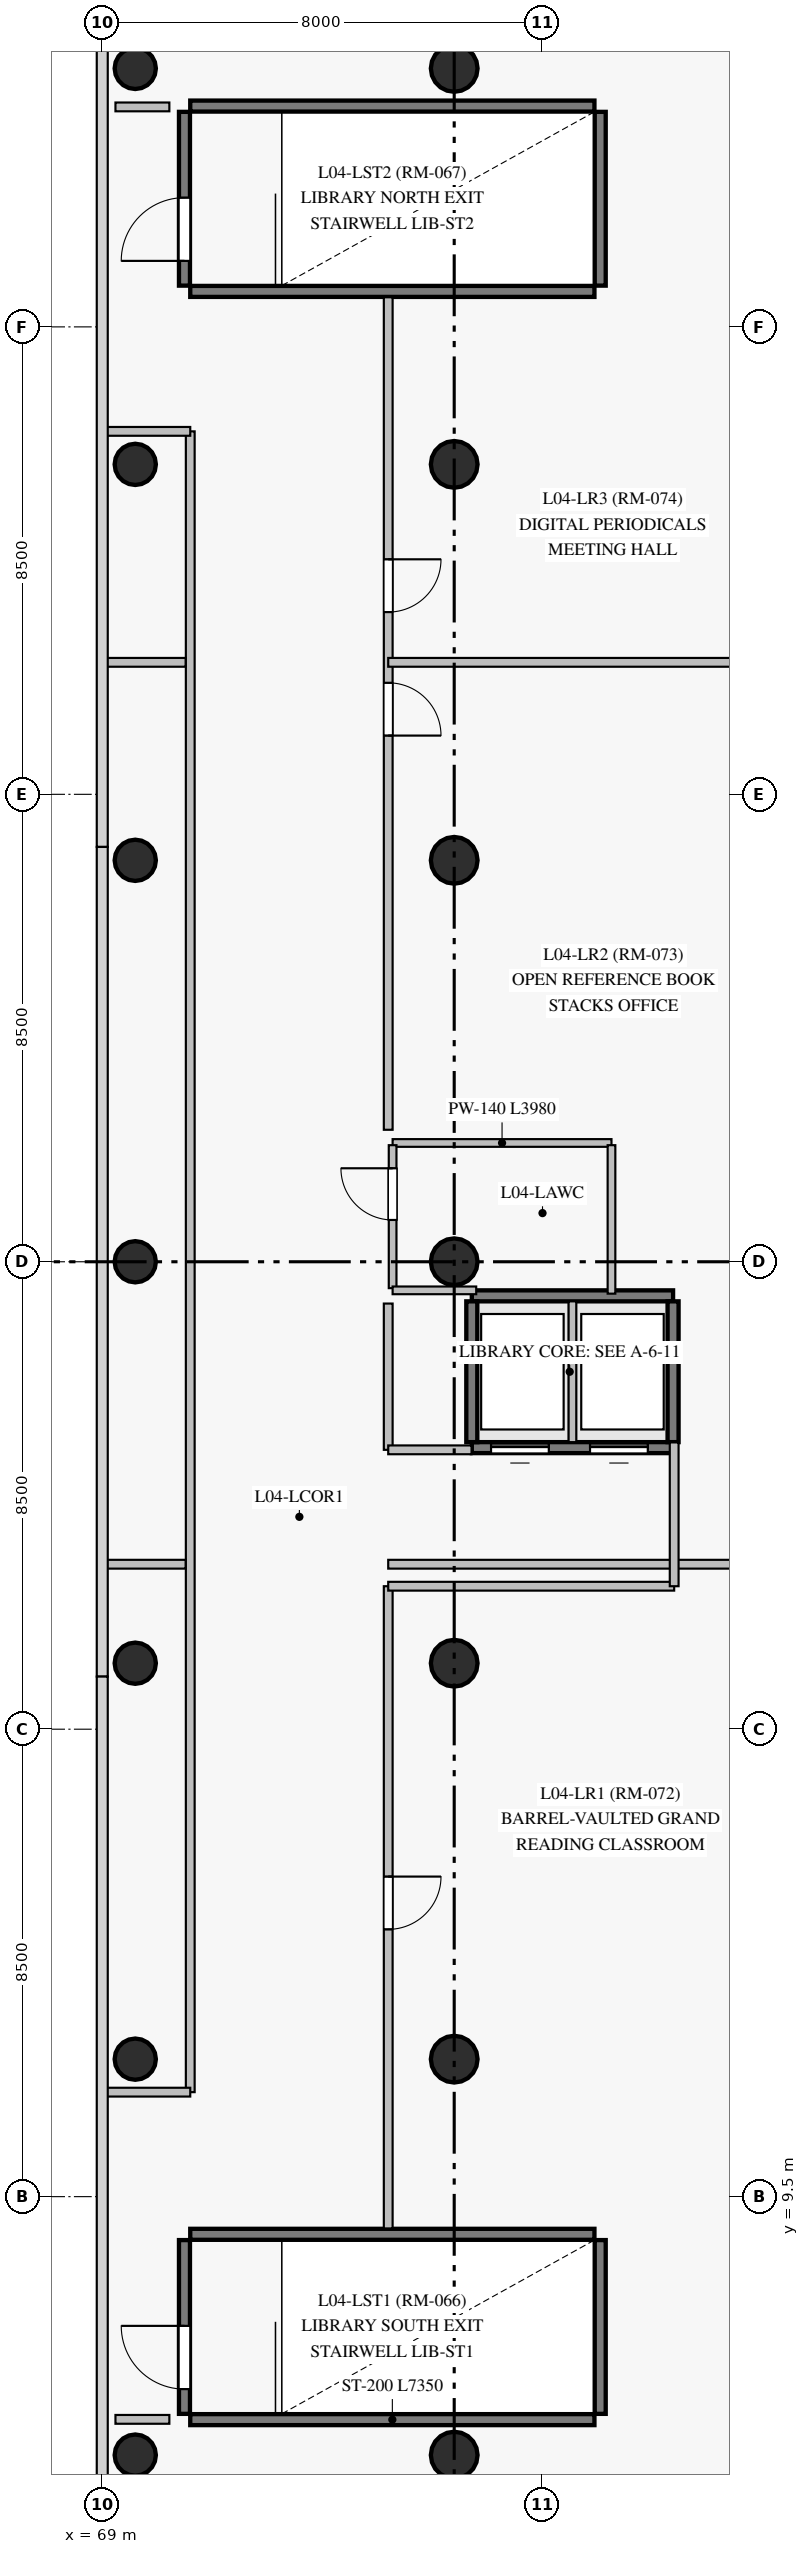
"""IFC4 building model, lengths in metres.
Left out: names, types, materials, properties, quantities, classifications, styles, units other than length and angle.
Written with IfcOpenShell. Run it as: python <this file> out.ifc"""

import sys

from ifc_helpers import new_model, si_unit, direction, frame, frame_2d, origin, origin_with_axes, origin_2d, place, context, subcontext, project, spatial, rectangle, circle, extrude, source, transform, mapped, element, fill, save


model = new_model("IFC4")
c1 = context("Model", 3, precision=1e-05, world=origin(), true_north=direction((0.0, 1.0)))
c2 = subcontext(c1, "Body", "Model", "MODEL_VIEW")
j1 = project(units=[si_unit("LENGTHUNIT", "METRE"), si_unit("PLANEANGLEUNIT", "RADIAN")], contexts=[c1])
p1 = place(None, origin())
s1 = spatial("IfcSite", under=j1, at=p1, CompositionType="ELEMENT")
p2 = place(p1, origin())
s2 = spatial("IfcBuilding", under=s1, at=p2, CompositionType="ELEMENT")
p3 = place(p2, frame((0.0, 0.0, 18.0)))
s3 = spatial("IfcBuildingStorey", under=s2, at=p3, CompositionType="ELEMENT", Elevation=18.0)
m1 = source(origin_with_axes(), c2, "Body", "SweptSolid", [
    extrude(circle(Radius=0.375, at=origin_2d()), origin(), (0.0, 0.0, 1.0), 4.225),
])
for number, where, z_axis, x_axis in (
    (1, (69.6, 4.8, 0.0), (0.0, 0.0, 1.0), (1.0, 0.0, 0.0)),
    (2, (69.6, 12.0, 0.0), (0.0, 0.0, 1.0), (1.0, 0.0, 0.0)),
    (3, (69.6, 19.2, 0.0), (0.0, 0.0, 1.0), (1.0, 0.0, 0.0)),
    (4, (69.6, 26.5, 0.0), (0.0, 0.0, 1.0), (1.0, 0.0, 0.0)),
    (5, (69.6, 33.8, 0.0), (0.0, 0.0, 1.0), (1.0, 0.0, 0.0)),
    (6, (69.6, 41.0, 0.0), (0.0, 0.0, 1.0), (1.0, 0.0, 0.0)),
    (7, (69.6, 48.2, 0.0), (0.0, 0.0, 1.0), (1.0, 0.0, 0.0)),
):
    element("IfcColumn", number, at=place(p3, frame(where, z_axis=z_axis, x_axis=x_axis)), inside=s3, PredefinedType="COLUMN", context=c2, shape_type="MappedRepresentation", body=[
        mapped(m1, transform((0.0, 0.0, 0.0), scale=1.0)),
    ])
m2 = source(origin_with_axes(), c2, "Body", "SweptSolid", [
    extrude(circle(Radius=0.425, at=origin_2d()), origin(), (0.0, 0.0, 1.0), 4.225),
])
for number, where, z_axis, x_axis in (
    (8, (75.4, 4.8, 0.0), (0.0, 0.0, 1.0), (1.0, 0.0, 0.0)),
    (9, (75.4, 12.0, 0.0), (0.0, 0.0, 1.0), (1.0, 0.0, 0.0)),
    (10, (75.4, 19.2, 0.0), (0.0, 0.0, 1.0), (1.0, 0.0, 0.0)),
    (11, (75.4, 26.5, 0.0), (0.0, 0.0, 1.0), (1.0, 0.0, 0.0)),
    (12, (75.4, 33.8, 0.0), (0.0, 0.0, 1.0), (1.0, 0.0, 0.0)),
    (13, (75.4, 41.0, 0.0), (0.0, 0.0, 1.0), (1.0, 0.0, 0.0)),
    (14, (75.4, 48.2, 0.0), (0.0, 0.0, 1.0), (1.0, 0.0, 0.0)),
):
    element("IfcColumn", number, at=place(p3, frame(where, z_axis=z_axis, x_axis=x_axis)), inside=s3, PredefinedType="COLUMN", context=c2, shape_type="MappedRepresentation", body=[
        mapped(m2, transform((0.0, 0.0, 0.0), scale=1.0)),
    ])
for number, where, z_axis, x_axis in (
    (15, (70.6, 5.445, 0.0), (0.0, 0.0, 1.0), (1.0, 0.0, 0.0)),
    (16, (70.6, 8.815, 0.0), (0.0, 0.0, 1.0), (1.0, 0.0, 0.0)),
    (17, (70.6, 44.145, 0.0), (0.0, 0.0, 1.0), (1.0, 0.0, 0.0)),
    (18, (70.6, 47.515, 0.0), (0.0, 0.0, 1.0), (1.0, 0.0, 0.0)),
):
    element("IfcWall", number, at=place(p3, frame(where, z_axis=z_axis, x_axis=x_axis)), inside=s3, PredefinedType="SHEAR", context=c2, shape_type="SweptSolid", body=[
        extrude(rectangle(XDim=7.35, YDim=0.2, at=frame_2d((3.675, 0.0))), origin(), (0.0, 0.0, 1.0), 4.225),
    ])
p4 = place(p3, frame((75.72, 23.12, 0.0), z_axis=(0.0, 0.0, 1.0), x_axis=(1.0, 0.0, 0.0)))
e19 = element("IfcWall", 19, at=p4, inside=s3, PredefinedType="SHEAR", context=c2, shape_type="SweptSolid", body=[
    extrude(rectangle(XDim=3.66, YDim=0.2, at=frame_2d((1.83, 0.0))), origin(), (0.0, 0.0, 1.0), 4.225),
])
p5 = place(p4, frame((0.35, 0.0, 0.0)))
e20 = element("IfcOpeningElement", 20, at=p5, cuts=e19, PredefinedType="OPENING", context=c2, shape_type="SweptSolid", body=[
    extrude(rectangle(XDim=1.05, YDim=2.15, at=frame_2d((0.525, 1.075))), frame((0.0, 0.11, 0.0), z_axis=(0.0, -1.0, 0.0), x_axis=(1.0, 0.0, 0.0)), (0.0, 0.0, 1.0), 0.22),
])
p6 = place(p4, frame((2.15, 0.0, 0.0)))
e21 = element("IfcOpeningElement", 21, at=p6, cuts=e19, PredefinedType="OPENING", context=c2, shape_type="SweptSolid", body=[
    extrude(rectangle(XDim=1.05, YDim=2.15, at=frame_2d((0.525, 1.075))), frame((0.0, 0.11, 0.0), z_axis=(0.0, -1.0, 0.0), x_axis=(1.0, 0.0, 0.0)), (0.0, 0.0, 1.0), 0.22),
])
p7 = place(p3, frame((75.72, 25.88, 0.0), z_axis=(0.0, 0.0, 1.0), x_axis=(1.0, 0.0, 0.0)))
e22 = element("IfcWall", 22, at=p7, inside=s3, PredefinedType="SHEAR", context=c2, shape_type="SweptSolid", body=[
    extrude(rectangle(XDim=3.66, YDim=0.2, at=frame_2d((1.83, 0.0))), origin(), (0.0, 0.0, 1.0), 4.225),
])
p8 = place(p3, frame((70.495, 5.55, 0.0), z_axis=(0.0, 0.0, 1.0), x_axis=(0.0, 1.0, 0.0)))
e23 = element("IfcWall", 23, at=p8, inside=s3, PredefinedType="SHEAR", context=c2, shape_type="SweptSolid", body=[
    extrude(rectangle(XDim=3.16, YDim=0.2, at=frame_2d((1.58, 0.0))), origin(), (0.0, 0.0, 1.0), 4.225),
])
p9 = place(p8, frame((0.45, 0.0, 0.0)))
e24 = element("IfcOpeningElement", 24, at=p9, cuts=e23, PredefinedType="OPENING", context=c2, shape_type="SweptSolid", body=[
    extrude(rectangle(XDim=1.15, YDim=2.15, at=frame_2d((0.575, 1.075))), frame((0.0, 0.11, 0.0), z_axis=(0.0, -1.0, 0.0), x_axis=(1.0, 0.0, 0.0)), (0.0, 0.0, 1.0), 0.22),
])
p10 = place(p3, frame((78.055, 5.55, 0.0), z_axis=(0.0, 0.0, 1.0), x_axis=(0.0, 1.0, 0.0)))
e25 = element("IfcWall", 25, at=p10, inside=s3, PredefinedType="SHEAR", context=c2, shape_type="SweptSolid", body=[
    extrude(rectangle(XDim=3.16, YDim=0.2, at=frame_2d((1.58, 0.0))), origin(), (0.0, 0.0, 1.0), 4.225),
])
p11 = place(p3, frame((70.495, 44.25, 0.0), z_axis=(0.0, 0.0, 1.0), x_axis=(0.0, 1.0, 0.0)))
e26 = element("IfcWall", 26, at=p11, inside=s3, PredefinedType="SHEAR", context=c2, shape_type="SweptSolid", body=[
    extrude(rectangle(XDim=3.16, YDim=0.2, at=frame_2d((1.58, 0.0))), origin(), (0.0, 0.0, 1.0), 4.225),
])
p12 = place(p11, frame((0.45, 0.0, 0.0)))
e27 = element("IfcOpeningElement", 27, at=p12, cuts=e26, PredefinedType="OPENING", context=c2, shape_type="SweptSolid", body=[
    extrude(rectangle(XDim=1.15, YDim=2.15, at=frame_2d((0.575, 1.075))), frame((0.0, 0.11, 0.0), z_axis=(0.0, -1.0, 0.0), x_axis=(1.0, 0.0, 0.0)), (0.0, 0.0, 1.0), 0.22),
])
p13 = place(p3, frame((78.055, 44.25, 0.0), z_axis=(0.0, 0.0, 1.0), x_axis=(0.0, 1.0, 0.0)))
e28 = element("IfcWall", 28, at=p13, inside=s3, PredefinedType="SHEAR", context=c2, shape_type="SweptSolid", body=[
    extrude(rectangle(XDim=3.16, YDim=0.2, at=frame_2d((1.58, 0.0))), origin(), (0.0, 0.0, 1.0), 4.225),
])
for number, where, z_axis, x_axis in (
    (29, (75.72, 23.22, 0.0), (0.0, 0.0, 1.0), (0.0, 1.0, 0.0)),
    (30, (79.38, 23.22, 0.0), (0.0, 0.0, 1.0), (0.0, 1.0, 0.0)),
):
    element("IfcWall", number, at=place(p3, frame(where, z_axis=z_axis, x_axis=x_axis)), inside=s3, PredefinedType="SHEAR", context=c2, shape_type="SweptSolid", body=[
        extrude(rectangle(XDim=2.56, YDim=0.2, at=frame_2d((1.28, 0.0))), origin(), (0.0, 0.0, 1.0), 4.225),
    ])
p14 = place(p3, frame((70.6, 11.4, 0.0), z_axis=(0.0, 0.0, 1.0), x_axis=(0.0, 1.0, 0.0)))
e31 = element("IfcWall", 31, at=p14, inside=s3, PredefinedType="PARTITIONING", context=c2, shape_type="SweptSolid", body=[
    extrude(rectangle(XDim=30.2, YDim=0.16, at=frame_2d((15.1, 0.0))), origin(), (0.0, 0.0, 1.0), 4.225),
])
p15 = place(p3, frame((74.2, 44.038, 0.0), z_axis=(0.0, 0.0, 1.0), x_axis=(0.0, -1.0, 0.0)))
e32 = element("IfcWall", 32, at=p15, inside=s3, PredefinedType="PARTITIONING", context=c2, shape_type="SweptSolid", body=[
    extrude(rectangle(XDim=15.138, YDim=0.16, at=frame_2d((7.569, 0.0))), origin(), (0.0, 0.0, 1.0), 4.225),
])
p16 = place(p15, frame((7.01, 0.0, 0.0)))
e33 = element("IfcOpeningElement", 33, at=p16, cuts=e32, PredefinedType="OPENING", context=c2, shape_type="SweptSolid", body=[
    extrude(rectangle(XDim=0.96, YDim=2.15, at=frame_2d((0.48, 1.075))), frame((0.0, 0.09, 0.0), z_axis=(0.0, -1.0, 0.0), x_axis=(1.0, 0.0, 0.0)), (0.0, 0.0, 1.0), 0.18),
])
p17 = place(p15, frame((4.764, 0.0, 0.0)))
e34 = element("IfcOpeningElement", 34, at=p17, cuts=e32, PredefinedType="OPENING", context=c2, shape_type="SweptSolid", body=[
    extrude(rectangle(XDim=0.96, YDim=2.15, at=frame_2d((0.48, 1.075))), frame((0.0, 0.09, 0.0), z_axis=(0.0, -1.0, 0.0), x_axis=(1.0, 0.0, 0.0)), (0.0, 0.0, 1.0), 0.18),
])
p18 = place(p3, frame((74.2, 20.6, 0.0), z_axis=(0.0, 0.0, 1.0), x_axis=(0.0, -1.0, 0.0)))
e35 = element("IfcWall", 35, at=p18, inside=s3, PredefinedType="PARTITIONING", context=c2, shape_type="SweptSolid", body=[
    extrude(rectangle(XDim=11.678, YDim=0.16, at=frame_2d((5.839, 0.0))), origin(), (0.0, 0.0, 1.0), 4.225),
])
p19 = place(p18, frame((5.28, 0.0, 0.0)))
e36 = element("IfcOpeningElement", 36, at=p19, cuts=e35, PredefinedType="OPENING", context=c2, shape_type="SweptSolid", body=[
    extrude(rectangle(XDim=0.96, YDim=2.15, at=frame_2d((0.48, 1.075))), frame((0.0, 0.09, 0.0), z_axis=(0.0, -1.0, 0.0), x_axis=(1.0, 0.0, 0.0)), (0.0, 0.0, 1.0), 0.18),
])
for number, where, z_axis, x_axis in (
    (37, (74.2, 21.0, 0.0), (0.0, 0.0, 1.0), (1.0, 0.0, 0.0)),
    (38, (74.2, 37.4, 0.0), (0.0, 0.0, 1.0), (1.0, 0.0, 0.0)),
):
    element("IfcWall", number, at=place(p3, frame(where, z_axis=z_axis, x_axis=x_axis)), inside=s3, PredefinedType="PARTITIONING", context=c2, shape_type="SweptSolid", body=[
        extrude(rectangle(XDim=7.545, YDim=0.16, at=frame_2d((3.772, 0.0))), origin(), (0.0, 0.0, 1.0), 4.225),
    ])
p20 = place(p3, frame((79.4, 20.6, 0.0), z_axis=(0.0, 0.0, 1.0), x_axis=(-1.0, 0.0, 0.0)))
e39 = element("IfcWall", 39, at=p20, inside=s3, PredefinedType="PARTITIONING", context=c2, shape_type="SweptSolid", body=[
    extrude(rectangle(XDim=5.2, YDim=0.16, at=frame_2d((2.6, 0.0))), origin(), (0.0, 0.0, 1.0), 4.225),
])
p21 = place(p3, frame((74.28, 28.66, 0.0), z_axis=(0.0, 0.0, 1.0), x_axis=(1.0, 0.0, 0.0)))
e40 = element("IfcWall", 40, at=p21, inside=s3, PredefinedType="PARTITIONING", context=c2, shape_type="SweptSolid", body=[
    extrude(rectangle(XDim=3.98, YDim=0.14, at=frame_2d((1.99, 0.0))), origin(), (0.0, 0.0, 1.0), 4.225),
])
p22 = place(p3, frame((78.26, 25.92, 0.0), z_axis=(0.0, 0.0, 1.0), x_axis=(0.0, 1.0, 0.0)))
e41 = element("IfcWall", 41, at=p22, inside=s3, PredefinedType="PARTITIONING", context=c2, shape_type="SweptSolid", body=[
    extrude(rectangle(XDim=2.7, YDim=0.14, at=frame_2d((1.35, 0.0))), origin(), (0.0, 0.0, 1.0), 4.225),
])
p23 = place(p3, frame((74.2, 25.74, 0.0), z_axis=(0.0, 0.0, 1.0), x_axis=(0.0, -1.0, 0.0)))
e42 = element("IfcWall", 42, at=p23, inside=s3, PredefinedType="PARTITIONING", context=c2, shape_type="SweptSolid", body=[
    extrude(rectangle(XDim=2.66, YDim=0.16, at=frame_2d((1.33, 0.0))), origin(), (0.0, 0.0, 1.0), 4.225),
])
p24 = place(p3, frame((74.28, 26.02, 0.0), z_axis=(0.0, 0.0, 1.0), x_axis=(0.0, 1.0, 0.0)))
e43 = element("IfcWall", 43, at=p24, inside=s3, PredefinedType="PARTITIONING", context=c2, shape_type="SweptSolid", body=[
    extrude(rectangle(XDim=2.6, YDim=0.14, at=frame_2d((1.3, 0.0))), origin(), (0.0, 0.0, 1.0), 4.225),
])
p25 = place(p24, frame((1.24, 0.0, 0.0)))
e44 = element("IfcOpeningElement", 44, at=p25, cuts=e43, PredefinedType="OPENING", context=c2, shape_type="SweptSolid", body=[
    extrude(rectangle(XDim=0.94, YDim=2.1, at=frame_2d((0.47, 1.05))), frame((0.0, 0.08, 0.0), z_axis=(0.0, -1.0, 0.0), x_axis=(1.0, 0.0, 0.0)), (0.0, 0.0, 1.0), 0.16),
])
p26 = place(p3, frame((77.55, 23.22, 0.0), z_axis=(0.0, 0.0, 1.0), x_axis=(0.0, 1.0, 0.0)))
e45 = element("IfcWall", 45, at=p26, inside=s3, PredefinedType="PARTITIONING", context=c2, shape_type="SweptSolid", body=[
    extrude(rectangle(XDim=2.56, YDim=0.14, at=frame_2d((1.28, 0.0))), origin(), (0.0, 0.0, 1.0), 4.225),
])
p27 = place(p3, frame((79.4, 23.215, 0.0), z_axis=(0.0, 0.0, 1.0), x_axis=(0.0, -1.0, 0.0)))
e46 = element("IfcWall", 46, at=p27, inside=s3, PredefinedType="PARTITIONING", context=c2, shape_type="SweptSolid", body=[
    extrude(rectangle(XDim=2.615, YDim=0.16, at=frame_2d((1.308, 0.0))), origin(), (0.0, 0.0, 1.0), 4.225),
])
p28 = place(p3, frame((74.28, 25.98, 0.0), z_axis=(0.0, 0.0, 1.0), x_axis=(1.0, 0.0, 0.0)))
e47 = element("IfcWall", 47, at=p28, inside=s3, PredefinedType="PARTITIONING", context=c2, shape_type="SweptSolid", body=[
    extrude(rectangle(XDim=1.52, YDim=0.14, at=frame_2d((0.76, 0.0))), origin(), (0.0, 0.0, 1.0), 4.225),
])
for number, where, z_axis, x_axis in (
    (48, (69.055, 21.0, 0.0), (0.0, 0.0, 1.0), (1.0, 0.0, 0.0)),
    (49, (69.055, 37.4, 0.0), (0.0, 0.0, 1.0), (1.0, 0.0, 0.0)),
):
    element("IfcWall", number, at=place(p3, frame(where, z_axis=z_axis, x_axis=x_axis)), inside=s3, PredefinedType="PARTITIONING", context=c2, shape_type="SweptSolid", body=[
        extrude(rectangle(XDim=1.461, YDim=0.16, at=frame_2d((0.73, 0.0))), origin(), (0.0, 0.0, 1.0), 4.225),
    ])
for number, where, z_axis, x_axis in (
    (50, (70.6, 41.6, 0.0), (0.0, 0.0, 1.0), (-1.0, 0.0, 0.0)),
    (51, (69.085, 11.4, 0.0), (0.0, 0.0, 1.0), (1.0, 0.0, 0.0)),
    (52, (74.2, 23.08, 0.0), (0.0, 0.0, 1.0), (1.0, 0.0, 0.0)),
):
    element("IfcWall", number, at=place(p3, frame(where, z_axis=z_axis, x_axis=x_axis)), inside=s3, PredefinedType="PARTITIONING", context=c2, shape_type="SweptSolid", body=[
        extrude(rectangle(XDim=1.515, YDim=0.16, at=frame_2d((0.758, 0.0))), origin(), (0.0, 0.0, 1.0), 4.225),
    ])
p29 = place(p3, frame((69.24, 47.5, 0.0), z_axis=(0.0, 0.0, 1.0), x_axis=(1.0, 0.0, 0.0)))
e53 = element("IfcWall", 53, at=p29, inside=s3, PredefinedType="PARTITIONING", context=c2, shape_type="SweptSolid", body=[
    extrude(rectangle(XDim=0.98, YDim=0.16, at=frame_2d((0.49, 0.0))), origin(), (0.0, 0.0, 1.0), 4.225),
])
p30 = place(p3, frame((70.22, 5.45, 0.0), z_axis=(0.0, 0.0, 1.0), x_axis=(-1.0, 0.0, 0.0)))
e54 = element("IfcWall", 54, at=p30, inside=s3, PredefinedType="PARTITIONING", context=c2, shape_type="SweptSolid", body=[
    extrude(rectangle(XDim=0.98, YDim=0.16, at=frame_2d((0.49, 0.0))), origin(), (0.0, 0.0, 1.0), 3.575),
])
m3 = source(origin_with_axes(), c2, "Body", "SweptSolid", [
    extrude(rectangle(XDim=1.15, YDim=2.15, at=frame_2d((0.575, 1.075))), frame((0.0, 0.025, 0.0), z_axis=(0.0, -1.0, 0.0), x_axis=(1.0, 0.0, 0.0)), (0.0, 0.0, 1.0), 0.05),
])
p31 = place(p9, origin())
e55 = element("IfcDoor", 55, at=p31, inside=s3, OperationType="SINGLE_SWING_RIGHT", PredefinedType="DOOR", context=c2, shape_type="MappedRepresentation", body=[
    mapped(m3, transform((0.0, 0.0, 0.0), scale=1.0)),
])
fill(e24, e55)
p32 = place(p12, origin())
e56 = element("IfcDoor", 56, at=p32, inside=s3, OperationType="SINGLE_SWING_LEFT", PredefinedType="DOOR", context=c2, shape_type="MappedRepresentation", body=[
    mapped(m3, transform((0.0, 0.0, 0.0), scale=1.0)),
])
fill(e27, e56)
m4 = source(origin_with_axes(), c2, "Body", "SweptSolid", [
    extrude(rectangle(XDim=1.05, YDim=2.15, at=frame_2d((0.525, 1.075))), frame((0.0, 0.025, 0.0), z_axis=(0.0, -1.0, 0.0), x_axis=(1.0, 0.0, 0.0)), (0.0, 0.0, 1.0), 0.05),
])
p33 = place(p5, origin())
e57 = element("IfcDoor", 57, at=p33, inside=s3, OperationType="SLIDING_TO_LEFT", PredefinedType="DOOR", context=c2, shape_type="MappedRepresentation", body=[
    mapped(m4, transform((0.0, 0.0, 0.0), scale=1.0)),
])
fill(e20, e57)
p34 = place(p6, origin())
e58 = element("IfcDoor", 58, at=p34, inside=s3, OperationType="SLIDING_TO_RIGHT", PredefinedType="DOOR", context=c2, shape_type="MappedRepresentation", body=[
    mapped(m4, transform((0.0, 0.0, 0.0), scale=1.0)),
])
fill(e21, e58)
m5 = source(origin_with_axes(), c2, "Body", "SweptSolid", [
    extrude(rectangle(XDim=0.94, YDim=2.1, at=frame_2d((0.47, 1.05))), frame((0.0, 0.025, 0.0), z_axis=(0.0, -1.0, 0.0), x_axis=(1.0, 0.0, 0.0)), (0.0, 0.0, 1.0), 0.05),
])
p35 = place(p25, origin())
e59 = element("IfcDoor", 59, at=p35, inside=s3, OperationType="SINGLE_SWING_RIGHT", PredefinedType="DOOR", context=c2, shape_type="MappedRepresentation", body=[
    mapped(m5, transform((0.0, 0.0, 0.0), scale=1.0)),
])
fill(e44, e59)
m6 = source(origin_with_axes(), c2, "Body", "SweptSolid", [
    extrude(rectangle(XDim=0.96, YDim=2.15, at=frame_2d((0.48, 1.075))), frame((0.0, 0.025, 0.0), z_axis=(0.0, -1.0, 0.0), x_axis=(1.0, 0.0, 0.0)), (0.0, 0.0, 1.0), 0.05),
])
p36 = place(p19, origin())
e60 = element("IfcDoor", 60, at=p36, inside=s3, OperationType="SINGLE_SWING_LEFT", PredefinedType="DOOR", context=c2, shape_type="MappedRepresentation", body=[
    mapped(m6, transform((0.0, 0.0, 0.0), scale=1.0)),
])
fill(e36, e60)
p37 = place(p16, origin())
e61 = element("IfcDoor", 61, at=p37, inside=s3, OperationType="SINGLE_SWING_RIGHT", PredefinedType="DOOR", context=c2, shape_type="MappedRepresentation", body=[
    mapped(m6, transform((0.0, 0.0, 0.0), scale=1.0)),
])
fill(e33, e61)
p38 = place(p17, origin())
e62 = element("IfcDoor", 62, at=p38, inside=s3, OperationType="SINGLE_SWING_LEFT", PredefinedType="DOOR", context=c2, shape_type="MappedRepresentation", body=[
    mapped(m6, transform((0.0, 0.0, 0.0), scale=1.0)),
])
fill(e34, e62)
save(model, sys.argv[1])
